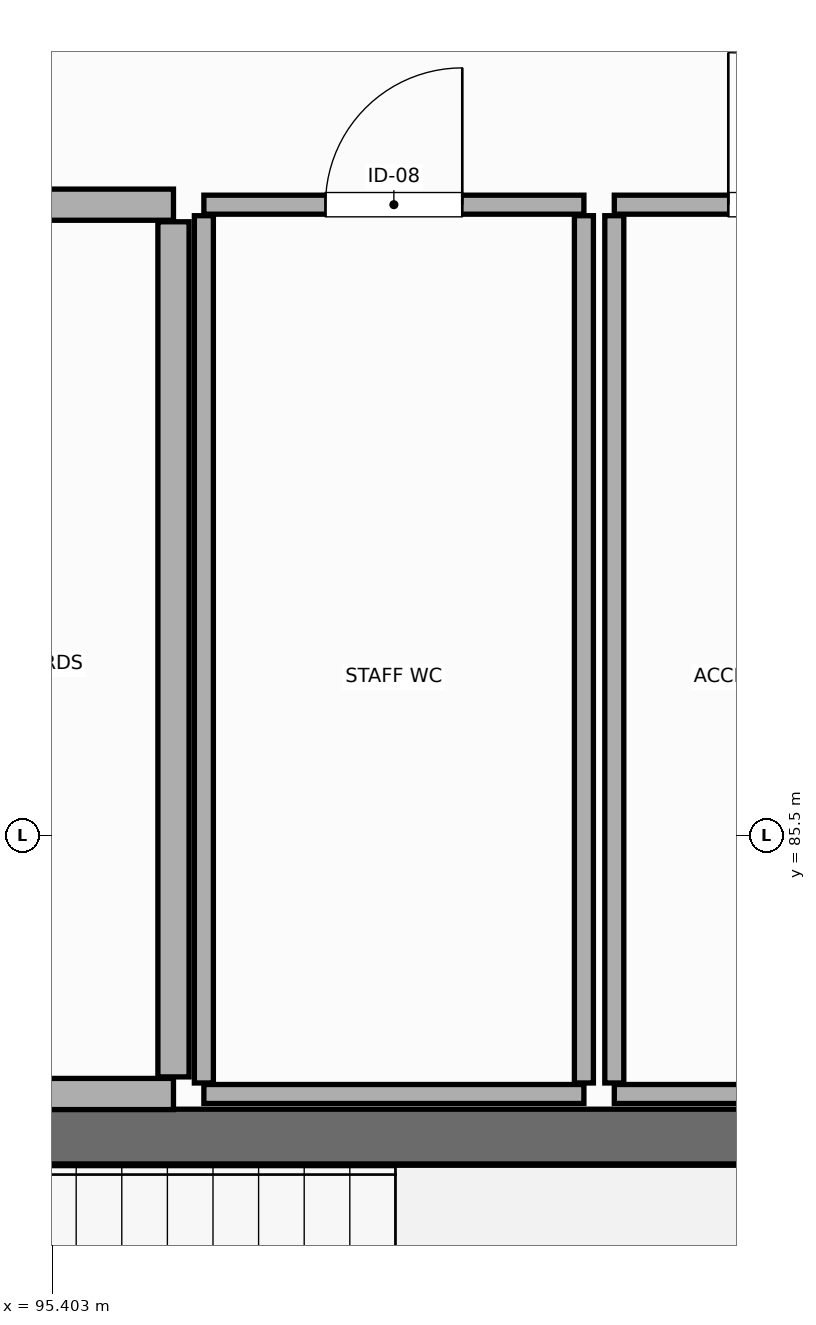
"""IFC4 building model, lengths in metres.
Left out: names, types, materials, properties, quantities, classifications, styles, units other than length and angle.
Written with IfcOpenShell. Run it as: python <this file> out.ifc"""

import sys

from ifc_helpers import new_model, si_unit, direction, frame, frame_2d, origin, place, context, subcontext, project, spatial, rectangle, extrude, element, fill, save


model = new_model("IFC4")
c1 = context("Model", 3, precision=1e-05, world=origin(), true_north=direction((0.0, 1.0)))
c2 = subcontext(c1, "Body", "Model", "MODEL_VIEW")
j1 = project(units=[si_unit("LENGTHUNIT", "METRE"), si_unit("PLANEANGLEUNIT", "RADIAN")], contexts=[c1])
p1 = place(None, origin())
s1 = spatial("IfcSite", under=j1, at=p1, CompositionType="ELEMENT")
p2 = place(p1, origin())
s2 = spatial("IfcBuilding", under=s1, at=p2, CompositionType="ELEMENT")
p3 = place(p2, frame((0.0, 0.0, 14.4)))
s3 = spatial("IfcBuildingStorey", under=s2, at=p3, CompositionType="ELEMENT", Elevation=14.4)
p4 = place(p3, frame((92.42, 83.52, 0.0), z_axis=(0.0, 0.0, 1.0), x_axis=(1.0, 0.0, 0.0)))
e1 = element("IfcWall", 1, at=p4, inside=s3, PredefinedType="SHEAR", context=c2, shape_type="SweptSolid", body=[
    extrude(rectangle(XDim=9.36, YDim=0.36, at=frame_2d((4.68, 0.0))), origin(), (0.0, 0.0, 1.0), 3.96),
])
p5 = place(p3, frame((96.4, 89.65, 0.0), z_axis=(0.0, 0.0, 1.0), x_axis=(1.0, 0.0, 0.0)))
e2 = element("IfcWall", 2, at=p5, inside=s3, PredefinedType="PARTITIONING", context=c2, shape_type="SweptSolid", body=[
    extrude(rectangle(XDim=2.5, YDim=0.125, at=frame_2d((1.25, 0.0))), origin(), (0.0, 0.0, 1.0), 3.945),
])
p6 = place(p5, frame((0.8, 0.0, 0.0)))
e3 = element("IfcOpeningElement", 3, at=p6, cuts=e2, PredefinedType="OPENING", context=c2, shape_type="SweptSolid", body=[
    extrude(rectangle(XDim=0.9, YDim=2.1, at=frame_2d((0.45, 1.05))), frame((0.0, 0.073, 0.0), z_axis=(0.0, -1.0, 0.0), x_axis=(1.0, 0.0, 0.0)), (0.0, 0.0, 1.0), 0.145),
])
p7 = place(p3, frame((98.9, 83.8, 0.0), z_axis=(0.0, 0.0, 1.0), x_axis=(-1.0, 0.0, 0.0)))
e4 = element("IfcWall", 4, at=p7, inside=s3, PredefinedType="PARTITIONING", context=c2, shape_type="SweptSolid", body=[
    extrude(rectangle(XDim=2.5, YDim=0.125, at=frame_2d((1.25, 0.0))), origin(), (0.0, 0.0, 1.0), 3.945),
])
for number, where, z_axis, x_axis in (
    (5, (96.4, 83.873, 0.0), (0.0, 0.0, 1.0), (0.0, 1.0, 0.0)),
    (6, (98.9, 89.577, 0.0), (0.0, 0.0, 1.0), (0.0, -1.0, 0.0)),
):
    element("IfcWall", number, at=place(p3, frame(where, z_axis=z_axis, x_axis=x_axis)), inside=s3, PredefinedType="PARTITIONING", context=c2, shape_type="SweptSolid", body=[
        extrude(rectangle(XDim=5.705, YDim=0.125, at=frame_2d((2.853, 0.0))), origin(), (0.0, 0.0, 1.0), 3.34),
    ])
p8 = place(p3, frame((99.1, 89.65, 0.0), z_axis=(0.0, 0.0, 1.0), x_axis=(1.0, 0.0, 0.0)))
e7 = element("IfcWall", 7, at=p8, inside=s3, PredefinedType="PARTITIONING", context=c2, shape_type="SweptSolid", body=[
    extrude(rectangle(XDim=2.5, YDim=0.125, at=frame_2d((1.25, 0.0))), origin(), (0.0, 0.0, 1.0), 3.09),
])
p9 = place(p8, frame((0.75, 0.0, 0.0)))
e8 = element("IfcOpeningElement", 8, at=p9, cuts=e7, PredefinedType="OPENING", context=c2, shape_type="SweptSolid", body=[
    extrude(rectangle(XDim=1.0, YDim=2.1, at=frame_2d((0.5, 1.05))), frame((0.0, 0.073, 0.0), z_axis=(0.0, -1.0, 0.0), x_axis=(1.0, 0.0, 0.0)), (0.0, 0.0, 1.0), 0.145),
])
p10 = place(p3, frame((101.6, 83.8, 0.0), z_axis=(0.0, 0.0, 1.0), x_axis=(-1.0, 0.0, 0.0)))
e9 = element("IfcWall", 9, at=p10, inside=s3, PredefinedType="PARTITIONING", context=c2, shape_type="SweptSolid", body=[
    extrude(rectangle(XDim=2.5, YDim=0.125, at=frame_2d((1.25, 0.0))), origin(), (0.0, 0.0, 1.0), 3.09),
])
p11 = place(p3, frame((99.1, 83.873, 0.0), z_axis=(0.0, 0.0, 1.0), x_axis=(0.0, 1.0, 0.0)))
e10 = element("IfcWall", 10, at=p11, inside=s3, PredefinedType="PARTITIONING", context=c2, shape_type="SweptSolid", body=[
    extrude(rectangle(XDim=5.705, YDim=0.125, at=frame_2d((2.853, 0.0))), origin(), (0.0, 0.0, 1.0), 3.34),
])
p12 = place(p3, frame((92.8, 89.65, 0.0), z_axis=(0.0, 0.0, 1.0), x_axis=(1.0, 0.0, 0.0)))
e11 = element("IfcWall", 11, at=p12, inside=s3, PredefinedType="STANDARD", context=c2, shape_type="SweptSolid", body=[
    extrude(rectangle(XDim=3.4, YDim=0.205, at=frame_2d((1.7, 0.0))), origin(), (0.0, 0.0, 1.0), 3.09),
])
p13 = place(p12, frame((1.0, 0.0, 0.0)))
e12 = element("IfcOpeningElement", 12, at=p13, cuts=e11, PredefinedType="OPENING", context=c2, shape_type="SweptSolid", body=[
    extrude(rectangle(XDim=1.4, YDim=2.25, at=frame_2d((0.7, 1.125))), frame((0.0, 0.113, 0.0), z_axis=(0.0, -1.0, 0.0), x_axis=(1.0, 0.0, 0.0)), (0.0, 0.0, 1.0), 0.225),
])
p14 = place(p3, frame((96.2, 83.8, 0.0), z_axis=(0.0, 0.0, 1.0), x_axis=(-1.0, 0.0, 0.0)))
e13 = element("IfcWall", 13, at=p14, inside=s3, PredefinedType="STANDARD", context=c2, shape_type="SweptSolid", body=[
    extrude(rectangle(XDim=3.4, YDim=0.205, at=frame_2d((1.7, 0.0))), origin(), (0.0, 0.0, 1.0), 3.09),
])
p15 = place(p3, frame((96.2, 89.538, 0.0), z_axis=(0.0, 0.0, 1.0), x_axis=(0.0, -1.0, 0.0)))
e14 = element("IfcWall", 14, at=p15, inside=s3, PredefinedType="STANDARD", context=c2, shape_type="SweptSolid", body=[
    extrude(rectangle(XDim=5.625, YDim=0.205, at=frame_2d((2.812, 0.0))), origin(), (0.0, 0.0, 1.0), 3.34),
])
p16 = place(p6, origin())
e15 = element("IfcDoor", 15, at=p16, inside=s3, OperationType="SINGLE_SWING_RIGHT", PredefinedType="DOOR", context=c2, shape_type="SweptSolid", body=[
    extrude(rectangle(XDim=0.9, YDim=2.1, at=frame_2d((0.45, 1.05))), frame((0.0, 0.025, 0.0), z_axis=(0.0, -1.0, 0.0), x_axis=(1.0, 0.0, 0.0)), (0.0, 0.0, 1.0), 0.05),
])
fill(e3, e15)
p17 = place(p9, origin())
e16 = element("IfcDoor", 16, at=p17, inside=s3, OperationType="SINGLE_SWING_LEFT", PredefinedType="DOOR", context=c2, shape_type="SweptSolid", body=[
    extrude(rectangle(XDim=1.0, YDim=2.1, at=frame_2d((0.5, 1.05))), frame((0.0, 0.025, 0.0), z_axis=(0.0, -1.0, 0.0), x_axis=(1.0, 0.0, 0.0)), (0.0, 0.0, 1.0), 0.05),
])
fill(e8, e16)
save(model, sys.argv[1])
